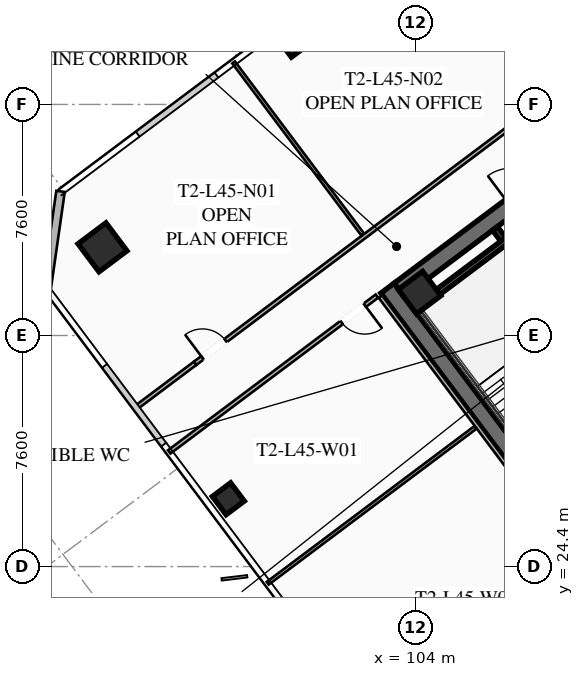
"""IFC4 building model, lengths in metres.
Left out: names, types, materials, properties, quantities, classifications, styles, units other than length and angle.
Written with IfcOpenShell. Run it as: python <this file> out.ifc"""

import sys

from ifc_helpers import new_model, si_unit, direction, frame, frame_2d, origin, origin_2d, place, context, subcontext, project, spatial, rectangle, hollow_rectangle, extrude, element, fill, save


model = new_model("IFC4")
c1 = context("Model", 3, precision=1e-05, world=origin(), true_north=direction((0.0, 1.0)))
c2 = subcontext(c1, "Body", "Model", "MODEL_VIEW")
j1 = project(units=[si_unit("LENGTHUNIT", "METRE"), si_unit("PLANEANGLEUNIT", "RADIAN")], contexts=[c1])
p1 = place(None, origin())
s1 = spatial("IfcSite", under=j1, at=p1, CompositionType="ELEMENT")
p2 = place(p1, origin())
s2 = spatial("IfcBuilding", under=s1, at=p2, CompositionType="ELEMENT")
p3 = place(p2, frame((0.0, 0.0, 167.65)))
s3 = spatial("IfcBuildingStorey", under=s2, at=p3, CompositionType="ELEMENT", Elevation=167.65)
p4 = place(p3, frame((112.436, 21.077, 0.0), z_axis=(0.0, 0.0, 1.0), x_axis=(-0.600005007985, 0.799996243986, 0.0)))
e1 = element("IfcWall", 1, at=p4, inside=s3, PredefinedType="SHEAR", context=c2, shape_type="SweptSolid", body=[
    extrude(rectangle(XDim=15.6, YDim=0.55, at=frame_2d((7.8, 0.0))), origin(), (0.0, 0.0, 1.0), 3.55),
])
p5 = place(p3, frame((103.461, 33.502, 0.0), z_axis=(0.0, 0.0, 1.0), x_axis=(0.799998054672, 0.600002593761, 0.0)))
e2 = element("IfcWall", 2, at=p5, inside=s3, PredefinedType="SHEAR", context=c2, shape_type="SweptSolid", body=[
    extrude(rectangle(XDim=15.06, YDim=0.55, at=frame_2d((7.53, 0.0))), origin(), (0.0, 0.0, 1.0), 3.55),
])
p6 = place(p5, frame((4.58, 0.0, 0.0)))
e3 = element("IfcOpeningElement", 3, at=p6, cuts=e2, PredefinedType="OPENING", context=c2, shape_type="SweptSolid", body=[
    extrude(rectangle(XDim=1.25, YDim=2.25, at=frame_2d((0.625, 1.125))), frame((0.0, 0.285, 0.0), z_axis=(0.0, -1.0, 0.0), x_axis=(1.0, 0.0, 0.0)), (0.0, 0.0, 1.0), 0.57),
])
p7 = place(p5, frame((9.63, 0.0, 0.0)))
e4 = element("IfcOpeningElement", 4, at=p7, cuts=e2, PredefinedType="OPENING", context=c2, shape_type="SweptSolid", body=[
    extrude(rectangle(XDim=1.25, YDim=2.25, at=frame_2d((0.625, 1.125))), frame((0.0, 0.285, 0.0), z_axis=(0.0, -1.0, 0.0), x_axis=(1.0, 0.0, 0.0)), (0.0, 0.0, 1.0), 0.57),
])
p8 = place(p3, frame((104.13, 33.41, 0.0), z_axis=(0.0, 0.0, 1.0), x_axis=(0.799999996291, 0.600000004945, 0.0)))
e5 = element("IfcColumn", 5, at=p8, inside=s3, PredefinedType="COLUMN", context=c2, shape_type="SweptSolid", body=[
    extrude(hollow_rectangle(XDim=1.0, YDim=1.0, WallThickness=0.04, at=origin_2d()), origin(), (0.0, 0.0, 1.0), 3.37),
])
p9 = place(p3, frame((93.7, 34.9, 0.0), z_axis=(0.0, 0.0, 1.0), x_axis=(0.799999996291, 0.600000004945, 0.0)))
e6 = element("IfcColumn", 6, at=p9, inside=s3, PredefinedType="COLUMN", context=c2, shape_type="SweptSolid", body=[
    extrude(hollow_rectangle(XDim=1.15, YDim=1.15, WallThickness=0.045, at=origin_2d()), origin(), (0.0, 0.0, 1.0), 3.37),
])
for number, where, z_axis, x_axis in (
    (7, (99.99, 41.68, 0.0), (0.0, 0.0, 1.0), (0.8, 0.6, 0.0)),
    (8, (97.84, 26.63, 0.0), (0.0, 0.0, 1.0), (0.8, 0.6, 0.0)),
):
    element("IfcColumn", number, at=place(p3, frame(where, z_axis=z_axis, x_axis=x_axis)), inside=s3, PredefinedType="COLUMN", context=c2, shape_type="SweptSolid", body=[
        extrude(hollow_rectangle(XDim=0.75, YDim=0.75, WallThickness=0.032, at=origin_2d()), origin(), (0.0, 0.0, 1.0), 3.37),
    ])
p10 = place(p3, frame((91.86, 33.52, 0.0), z_axis=(0.0, 0.0, 1.0), x_axis=(0.141410847992, 0.989950994782, 0.0)))
e9 = element("IfcWall", 9, at=p10, inside=s3, PredefinedType="SOLIDWALL", context=c2, shape_type="SweptSolid", body=[
    extrude(rectangle(XDim=3.253, YDim=0.28, at=frame_2d((1.626, 0.0))), origin(), (0.0, 0.0, 1.0), 3.37),
])
p11 = place(p3, frame((111.44, 29.08, 0.0), z_axis=(0.0, 0.0, 1.0), x_axis=(-0.59999029481, 0.8000072788, 0.0)))
e10 = element("IfcWall", 10, at=p11, inside=s3, PredefinedType="SHEAR", context=c2, shape_type="SweptSolid", body=[
    extrude(rectangle(XDim=8.05, YDim=0.2, at=frame_2d((4.025, 0.0))), origin(), (0.0, 0.0, 1.0), 3.37),
])
p12 = place(p11, frame((0.45, 0.0, 0.0)))
e11 = element("IfcOpeningElement", 11, at=p12, cuts=e10, PredefinedType="OPENING", context=c2, shape_type="SweptSolid", body=[
    extrude(rectangle(XDim=1.15, YDim=2.2, at=frame_2d((0.575, 1.1))), frame((0.0, 0.11, 0.0), z_axis=(0.0, -1.0, 0.0), x_axis=(1.0, 0.0, 0.0)), (0.0, 0.0, 1.0), 0.22),
])
p13 = place(p3, frame((103.956, 32.842, 0.0), z_axis=(0.0, 0.0, 1.0), x_axis=(0.800015298837, 0.599979601008, 0.0)))
e12 = element("IfcWall", 12, at=p13, inside=s3, PredefinedType="SHEAR", context=c2, shape_type="SweptSolid", body=[
    extrude(rectangle(XDim=3.83, YDim=0.2, at=frame_2d((1.915, 0.0))), origin(), (0.0, 0.0, 1.0), 3.37),
])
p14 = place(p3, frame((96.748, 31.086, 0.0), z_axis=(0.0, 0.0, 1.0), x_axis=(0.8, 0.6, 0.0)))
e13 = element("IfcWall", 13, at=p14, inside=s3, PredefinedType="PARTITIONING", context=c2, shape_type="SweptSolid", body=[
    extrude(rectangle(XDim=28.7, YDim=0.135, at=frame_2d((14.35, 0.0))), origin(), (0.0, 0.0, 1.0), 2.723),
])
p15 = place(p14, frame((0.3, 0.0, 0.0)))
e14 = element("IfcOpeningElement", 14, at=p15, cuts=e13, PredefinedType="OPENING", context=c2, shape_type="SweptSolid", body=[
    extrude(rectangle(XDim=0.95, YDim=2.05, at=frame_2d((0.475, 1.025))), frame((0.0, 0.077, 0.0), z_axis=(0.0, -1.0, 0.0), x_axis=(1.0, 0.0, 0.0)), (0.0, 0.0, 1.0), 0.155),
])
p16 = place(p14, frame((13.999, 0.0, 0.0)))
e15 = element("IfcOpeningElement", 15, at=p16, cuts=e13, PredefinedType="OPENING", context=c2, shape_type="SweptSolid", body=[
    extrude(rectangle(XDim=0.95, YDim=2.05, at=frame_2d((0.475, 1.025))), frame((0.0, 0.077, 0.0), z_axis=(0.0, -1.0, 0.0), x_axis=(1.0, 0.0, 0.0)), (0.0, 0.0, 1.0), 0.155),
])
p17 = place(p14, frame((27.45, 0.0, 0.0)))
e16 = element("IfcOpeningElement", 16, at=p17, cuts=e13, PredefinedType="OPENING", context=c2, shape_type="SweptSolid", body=[
    extrude(rectangle(XDim=0.95, YDim=2.05, at=frame_2d((0.475, 1.025))), frame((0.0, 0.077, 0.0), z_axis=(0.0, -1.0, 0.0), x_axis=(1.0, 0.0, 0.0)), (0.0, 0.0, 1.0), 0.155),
])
p18 = place(p3, frame((94.804, 29.628, 0.0), z_axis=(0.0, 0.0, 1.0), x_axis=(0.800012055778, 0.599983925293, 0.0)))
e17 = element("IfcWall", 17, at=p18, inside=s3, PredefinedType="PARTITIONING", context=c2, shape_type="SweptSolid", body=[
    extrude(rectangle(XDim=2.43, YDim=0.135, at=frame_2d((1.215, 0.0))), origin(), (0.0, 0.0, 1.0), 2.723),
])
p19 = place(p3, frame((102.26, 35.32, 0.0), z_axis=(0.0, 0.0, 1.0), x_axis=(-0.600016552052, 0.799987585693, 0.0)))
e18 = element("IfcWall", 18, at=p19, inside=s3, PredefinedType="PARTITIONING", context=c2, shape_type="SweptSolid", body=[
    extrude(rectangle(XDim=7.08, YDim=0.11, at=frame_2d((3.54, 0.0))), origin(), (0.0, 0.0, 1.0), 2.723),
])
p20 = place(p3, frame((112.104, 20.928, 0.0), z_axis=(0.0, 0.0, 1.0), x_axis=(-0.599994940075, 0.800003794918, 0.0)))
e19 = element("IfcWall", 19, at=p20, inside=s3, PredefinedType="PARTITIONING", context=c2, shape_type="SweptSolid", body=[
    extrude(rectangle(XDim=15.44, YDim=0.135, at=frame_2d((7.72, 0.0))), origin(), (0.0, 0.0, 1.0), 2.723),
])
p21 = place(p3, frame((102.728, 33.296, 0.0), z_axis=(0.0, 0.0, 1.0), x_axis=(-0.800013722153, -0.59998170336, 0.0)))
e20 = element("IfcWall", 20, at=p21, inside=s3, PredefinedType="PARTITIONING", context=c2, shape_type="SweptSolid", body=[
    extrude(rectangle(XDim=8.54, YDim=0.135, at=frame_2d((4.27, 0.0))), origin(), (0.0, 0.0, 1.0), 2.723),
])
p22 = place(p21, frame((0.5, 0.0, 0.0)))
e21 = element("IfcOpeningElement", 21, at=p22, cuts=e20, PredefinedType="OPENING", context=c2, shape_type="SweptSolid", body=[
    extrude(rectangle(XDim=0.95, YDim=2.05, at=frame_2d((0.475, 1.025))), frame((0.0, 0.077, 0.0), z_axis=(0.0, -1.0, 0.0), x_axis=(1.0, 0.0, 0.0)), (0.0, 0.0, 1.0), 0.155),
])
p23 = place(p3, frame((99.136, 23.852, 0.0), z_axis=(0.0, 0.0, 1.0), x_axis=(0.8, 0.6, 0.0)))
e22 = element("IfcWall", 22, at=p23, inside=s3, PredefinedType="PARTITIONING", context=c2, shape_type="SweptSolid", body=[
    extrude(rectangle(XDim=8.54, YDim=0.11, at=frame_2d((4.27, 0.0))), origin(), (0.0, 0.0, 1.0), 2.723),
])
p24 = place(p15, origin())
e23 = element("IfcDoor", 23, at=p24, inside=s3, OperationType="SINGLE_SWING_LEFT", PredefinedType="DOOR", context=c2, shape_type="SweptSolid", body=[
    extrude(rectangle(XDim=0.95, YDim=2.05, at=frame_2d((0.475, 1.025))), frame((0.0, 0.025, 0.0), z_axis=(0.0, -1.0, 0.0), x_axis=(1.0, 0.0, 0.0)), (0.0, 0.0, 1.0), 0.05),
])
fill(e14, e23)
p25 = place(p22, origin())
e24 = element("IfcDoor", 24, at=p25, inside=s3, OperationType="SINGLE_SWING_LEFT", PredefinedType="DOOR", context=c2, shape_type="SweptSolid", body=[
    extrude(rectangle(XDim=0.95, YDim=2.05, at=frame_2d((0.475, 1.025))), frame((0.0, 0.025, 0.0), z_axis=(0.0, -1.0, 0.0), x_axis=(1.0, 0.0, 0.0)), (0.0, 0.0, 1.0), 0.05),
])
fill(e21, e24)
save(model, sys.argv[1])
